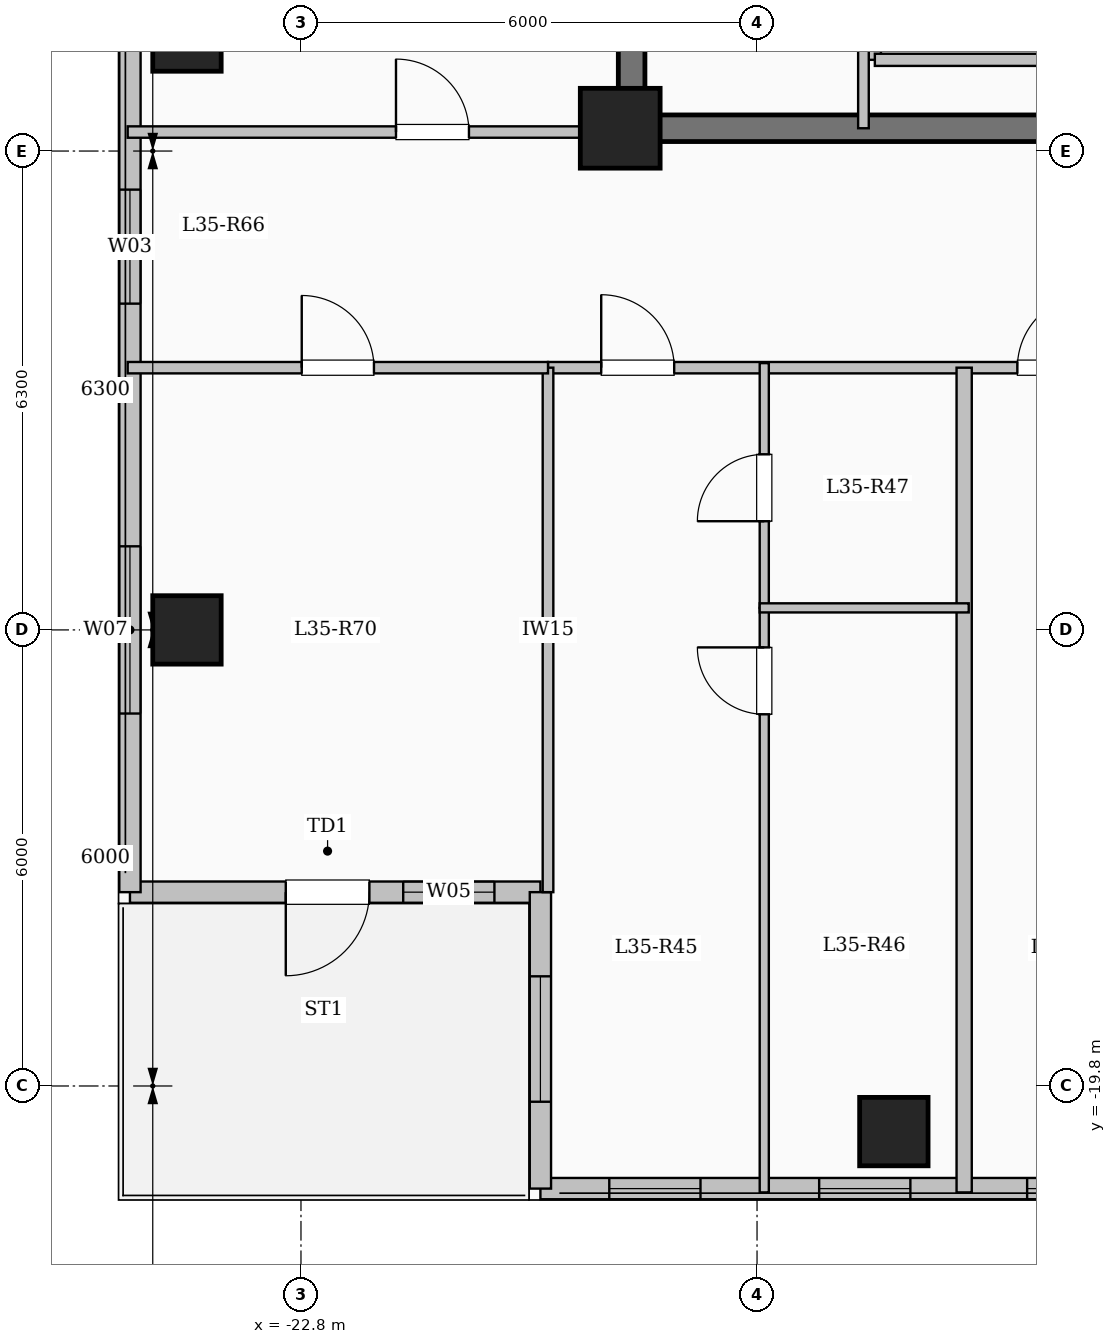
"""IFC4 building model, lengths in metres.
Left out: names, types, materials, properties, quantities, classifications, styles, units other than length and angle.
Written with IfcOpenShell. Run it as: python <this file> out.ifc"""

import sys

from ifc_helpers import new_model, si_unit, direction, frame, frame_2d, origin, origin_2d, place, context, subcontext, project, spatial, rectangle, extrude, element, fill, save


model = new_model("IFC4")
c1 = context("Model", 3, precision=1e-05, world=origin(), true_north=direction((0.0, 1.0)))
c2 = subcontext(c1, "Body", "Model", "MODEL_VIEW")
j1 = project(units=[si_unit("LENGTHUNIT", "METRE"), si_unit("PLANEANGLEUNIT", "RADIAN")], contexts=[c1])
p1 = place(None, origin())
s1 = spatial("IfcSite", under=j1, at=p1, CompositionType="ELEMENT")
p2 = place(p1, origin())
s2 = spatial("IfcBuilding", under=s1, at=p2, CompositionType="ELEMENT")
p3 = place(p2, frame((0.0, 0.0, 132.6)))
s3 = spatial("IfcBuildingStorey", under=s2, at=p3, CompositionType="ELEMENT", Elevation=132.6)
p4 = place(p3, frame((-18.6, -7.2, 0.0), z_axis=(0.0, 0.0, 1.0), x_axis=(1.0, 0.0, 0.0)))
e1 = element("IfcColumn", 1, at=p4, inside=s3, PredefinedType="COLUMN", context=c2, shape_type="SweptSolid", body=[
    extrude(rectangle(XDim=1.05, YDim=1.05, at=origin_2d()), origin(), (0.0, 0.0, 1.0), 3.35),
])
for number, where, z_axis, x_axis in (
    (2, (-15.0, -20.4, 0.0), (0.0, 0.0, 1.0), (1.0, 0.0, 0.0)),
    (3, (-24.3, -13.8, 0.0), (0.0, 0.0, 1.0), (1.0, 0.0, 0.0)),
    (4, (-24.3, -6.0, 0.0), (0.0, 0.0, 1.0), (1.0, 0.0, 0.0)),
):
    element("IfcColumn", number, at=place(p3, frame(where, z_axis=z_axis, x_axis=x_axis)), inside=s3, PredefinedType="COLUMN", context=c2, shape_type="SweptSolid", body=[
        extrude(rectangle(XDim=0.9, YDim=0.9, at=origin_2d()), origin(), (0.0, 0.0, 1.0), 3.35),
    ])
p5 = place(p3, frame((-19.65, -17.25, 0.0), z_axis=(0.0, 0.0, 1.0), x_axis=(-1.0, 0.0, 0.0)))
e5 = element("IfcWall", 5, at=p5, inside=s3, PredefinedType="SOLIDWALL", context=c2, shape_type="SweptSolid", body=[
    extrude(rectangle(XDim=5.4, YDim=0.28, at=frame_2d((2.7, 0.0))), origin(), (0.0, 0.0, 1.0), 3.1),
])
p6 = place(p5, frame((2.25, 0.0, 0.0)))
e6 = element("IfcOpeningElement", 6, at=p6, cuts=e5, PredefinedType="OPENING", context=c2, shape_type="SweptSolid", body=[
    extrude(rectangle(XDim=1.1, YDim=2.2, at=frame_2d((0.55, 1.1))), frame((0.0, 0.15, 0.0), z_axis=(0.0, -1.0, 0.0), x_axis=(1.0, 0.0, 0.0)), (0.0, 0.0, 1.0), 0.3),
])
p7 = place(p5, frame((0.605, 0.0, 0.95)))
e7 = element("IfcOpeningElement", 7, at=p7, cuts=e5, PredefinedType="OPENING", context=c2, shape_type="SweptSolid", body=[
    extrude(rectangle(XDim=1.2, YDim=1.5, at=frame_2d((0.6, 0.75))), frame((0.0, 0.15, 0.0), z_axis=(0.0, -1.0, 0.0), x_axis=(1.0, 0.0, 0.0)), (0.0, 0.0, 1.0), 0.3),
])
p8 = place(p3, frame((-25.05, -17.25, 0.0), z_axis=(0.0, 0.0, 1.0), x_axis=(0.0, 1.0, 0.0)))
e8 = element("IfcWall", 8, at=p8, inside=s3, PredefinedType="SOLIDWALL", context=c2, shape_type="SweptSolid", body=[
    extrude(rectangle(XDim=34.5, YDim=0.28, at=frame_2d((17.25, 0.0))), origin(), (0.0, 0.0, 1.0), 3.1),
])
p9 = place(p8, frame((2.35, 0.0, 0.9)))
e9 = element("IfcOpeningElement", 9, at=p9, cuts=e8, PredefinedType="OPENING", context=c2, shape_type="SweptSolid", body=[
    extrude(rectangle(XDim=2.2, YDim=1.75, at=frame_2d((1.1, 0.875))), frame((0.0, 0.15, 0.0), z_axis=(0.0, -1.0, 0.0), x_axis=(1.0, 0.0, 0.0)), (0.0, 0.0, 1.0), 0.3),
])
p10 = place(p8, frame((7.742, 0.0, 0.9)))
e10 = element("IfcOpeningElement", 10, at=p10, cuts=e8, PredefinedType="OPENING", context=c2, shape_type="SweptSolid", body=[
    extrude(rectangle(XDim=1.5, YDim=1.65, at=frame_2d((0.75, 0.825))), frame((0.0, 0.15, 0.0), z_axis=(0.0, -1.0, 0.0), x_axis=(1.0, 0.0, 0.0)), (0.0, 0.0, 1.0), 0.3),
])
p11 = place(p8, frame((13.25, 0.0, 0.9)))
e11 = element("IfcOpeningElement", 11, at=p11, cuts=e8, PredefinedType="OPENING", context=c2, shape_type="SweptSolid", body=[
    extrude(rectangle(XDim=2.2, YDim=1.75, at=frame_2d((1.1, 0.875))), frame((0.0, 0.15, 0.0), z_axis=(0.0, -1.0, 0.0), x_axis=(1.0, 0.0, 0.0)), (0.0, 0.0, 1.0), 0.3),
])
p12 = place(p8, frame((19.65, 0.0, 0.9)))
e12 = element("IfcOpeningElement", 12, at=p12, cuts=e8, PredefinedType="OPENING", context=c2, shape_type="SweptSolid", body=[
    extrude(rectangle(XDim=1.65, YDim=1.6, at=frame_2d((0.825, 0.8))), frame((0.0, 0.15, 0.0), z_axis=(0.0, -1.0, 0.0), x_axis=(1.0, 0.0, 0.0)), (0.0, 0.0, 1.0), 0.3),
])
p13 = place(p8, frame((24.125, 0.0, 0.9)))
e13 = element("IfcOpeningElement", 13, at=p13, cuts=e8, PredefinedType="OPENING", context=c2, shape_type="SweptSolid", body=[
    extrude(rectangle(XDim=2.0, YDim=1.7, at=frame_2d((1.0, 0.85))), frame((0.0, 0.15, 0.0), z_axis=(0.0, -1.0, 0.0), x_axis=(1.0, 0.0, 0.0)), (0.0, 0.0, 1.0), 0.3),
])
p14 = place(p8, frame((28.375, 0.0, 0.95)))
e14 = element("IfcOpeningElement", 14, at=p14, cuts=e8, PredefinedType="OPENING", context=c2, shape_type="SweptSolid", body=[
    extrude(rectangle(XDim=1.0, YDim=1.5, at=frame_2d((0.5, 0.75))), frame((0.0, 0.15, 0.0), z_axis=(0.0, -1.0, 0.0), x_axis=(1.0, 0.0, 0.0)), (0.0, 0.0, 1.0), 0.3),
])
p15 = place(p8, frame((31.125, 0.0, 0.9)))
e15 = element("IfcOpeningElement", 15, at=p15, cuts=e8, PredefinedType="OPENING", context=c2, shape_type="SweptSolid", body=[
    extrude(rectangle(XDim=2.0, YDim=1.7, at=frame_2d((1.0, 0.85))), frame((0.0, 0.15, 0.0), z_axis=(0.0, -1.0, 0.0), x_axis=(1.0, 0.0, 0.0)), (0.0, 0.0, 1.0), 0.3),
])
p16 = place(p3, frame((-7.35, -21.15, 0.0), z_axis=(0.0, 0.0, 1.0), x_axis=(-1.0, 0.0, 0.0)))
e16 = element("IfcWall", 16, at=p16, inside=s3, PredefinedType="SOLIDWALL", context=c2, shape_type="SweptSolid", body=[
    extrude(rectangle(XDim=12.3, YDim=0.28, at=frame_2d((6.15, 0.0))), origin(), (0.0, 0.0, 1.0), 3.1),
])
p17 = place(p16, frame((0.147, 0.0, 0.95)))
e17 = element("IfcOpeningElement", 17, at=p17, cuts=e16, PredefinedType="OPENING", context=c2, shape_type="SweptSolid", body=[
    extrude(rectangle(XDim=0.85, YDim=1.5, at=frame_2d((0.425, 0.75))), frame((0.0, 0.15, 0.0), z_axis=(0.0, -1.0, 0.0), x_axis=(1.0, 0.0, 0.0)), (0.0, 0.0, 1.0), 0.3),
])
p18 = place(p16, frame((1.96, 0.0, 0.95)))
e18 = element("IfcOpeningElement", 18, at=p18, cuts=e16, PredefinedType="OPENING", context=c2, shape_type="SweptSolid", body=[
    extrude(rectangle(XDim=1.2, YDim=1.5, at=frame_2d((0.6, 0.75))), frame((0.0, 0.15, 0.0), z_axis=(0.0, -1.0, 0.0), x_axis=(1.0, 0.0, 0.0)), (0.0, 0.0, 1.0), 0.3),
])
p19 = place(p16, frame((4.697, 0.0, 0.95)))
e19 = element("IfcOpeningElement", 19, at=p19, cuts=e16, PredefinedType="OPENING", context=c2, shape_type="SweptSolid", body=[
    extrude(rectangle(XDim=1.2, YDim=1.5, at=frame_2d((0.6, 0.75))), frame((0.0, 0.15, 0.0), z_axis=(0.0, -1.0, 0.0), x_axis=(1.0, 0.0, 0.0)), (0.0, 0.0, 1.0), 0.3),
])
p20 = place(p16, frame((7.433, 0.0, 0.95)))
e20 = element("IfcOpeningElement", 20, at=p20, cuts=e16, PredefinedType="OPENING", context=c2, shape_type="SweptSolid", body=[
    extrude(rectangle(XDim=1.2, YDim=1.5, at=frame_2d((0.6, 0.75))), frame((0.0, 0.15, 0.0), z_axis=(0.0, -1.0, 0.0), x_axis=(1.0, 0.0, 0.0)), (0.0, 0.0, 1.0), 0.3),
])
p21 = place(p16, frame((10.194, 0.0, 0.95)))
e21 = element("IfcOpeningElement", 21, at=p21, cuts=e16, PredefinedType="OPENING", context=c2, shape_type="SweptSolid", body=[
    extrude(rectangle(XDim=1.2, YDim=1.5, at=frame_2d((0.6, 0.75))), frame((0.0, 0.15, 0.0), z_axis=(0.0, -1.0, 0.0), x_axis=(1.0, 0.0, 0.0)), (0.0, 0.0, 1.0), 0.3),
])
p22 = place(p3, frame((-19.65, -21.15, 0.0), z_axis=(0.0, 0.0, 1.0), x_axis=(0.0, 1.0, 0.0)))
e22 = element("IfcWall", 22, at=p22, inside=s3, PredefinedType="SOLIDWALL", context=c2, shape_type="SweptSolid", body=[
    extrude(rectangle(XDim=3.9, YDim=0.28, at=frame_2d((1.95, 0.0))), origin(), (0.0, 0.0, 1.0), 3.1),
])
p23 = place(p22, frame((1.143, 0.0, 0.9)))
e23 = element("IfcOpeningElement", 23, at=p23, cuts=e22, PredefinedType="OPENING", context=c2, shape_type="SweptSolid", body=[
    extrude(rectangle(XDim=1.65, YDim=1.6, at=frame_2d((0.825, 0.8))), frame((0.0, 0.15, 0.0), z_axis=(0.0, -1.0, 0.0), x_axis=(1.0, 0.0, 0.0)), (0.0, 0.0, 1.0), 0.3),
])
p24 = place(p3, frame((-15.25, -6.3, 0.0), z_axis=(0.0, 0.0, 1.0), x_axis=(0.0, 1.0, 0.0)))
e24 = element("IfcWall", 24, at=p24, inside=s3, PredefinedType="SOLIDWALL", context=c2, shape_type="SweptSolid", body=[
    extrude(rectangle(XDim=2.6, YDim=0.16, at=frame_2d((1.3, 0.0))), origin(), (0.0, 0.0, 1.0), 3.1),
])
p25 = place(p3, frame((-15.25, -6.3, 0.0), z_axis=(0.0, 0.0, 1.0), x_axis=(1.0, 0.0, 0.0)))
e25 = element("IfcWall", 25, at=p25, inside=s3, PredefinedType="SOLIDWALL", context=c2, shape_type="SweptSolid", body=[
    extrude(rectangle(XDim=2.3, YDim=0.16, at=frame_2d((1.15, 0.0))), origin(), (0.0, 0.0, 1.0), 3.1),
])
p26 = place(p3, frame((-18.45, -7.375, 0.0), z_axis=(0.0, 0.0, 1.0), x_axis=(0.0, 1.0, 0.0)))
e26 = element("IfcWall", 26, at=p26, inside=s3, PredefinedType="SHEAR", context=c2, shape_type="SweptSolid", body=[
    extrude(rectangle(XDim=14.05, YDim=0.35, at=frame_2d((7.025, 0.0))), origin(), (0.0, 0.0, 1.0), 3.35),
])
p27 = place(p3, frame((-18.625, -7.2, 0.0), z_axis=(0.0, 0.0, 1.0), x_axis=(1.0, 0.0, 0.0)))
e27 = element("IfcWall", 27, at=p27, inside=s3, PredefinedType="SHEAR", context=c2, shape_type="SweptSolid", body=[
    extrude(rectangle(XDim=8.55, YDim=0.35, at=frame_2d((4.275, 0.0))), origin(), (0.0, 0.0, 1.0), 3.35),
])
p28 = place(p3, frame((-15.4, -7.2, 0.0), z_axis=(0.0, 0.0, 1.0), x_axis=(0.0, 1.0, 0.0)))
e28 = element("IfcWall", 28, at=p28, inside=s3, PredefinedType="PARTITIONING", context=c2, shape_type="SweptSolid", body=[
    extrude(rectangle(XDim=10.45, YDim=0.14, at=frame_2d((5.225, 0.0))), origin(), (0.0, 0.0, 1.0), 3.1),
])
p29 = place(p28, frame((9.25, 0.0, 0.0)))
e29 = element("IfcOpeningElement", 29, at=p29, cuts=e28, PredefinedType="OPENING", context=c2, shape_type="SweptSolid", body=[
    extrude(rectangle(XDim=0.9, YDim=2.08, at=frame_2d((0.45, 1.04))), frame((0.0, 0.08, 0.0), z_axis=(0.0, -1.0, 0.0), x_axis=(1.0, 0.0, 0.0)), (0.0, 0.0, 1.0), 0.16),
])
p30 = place(p3, frame((-19.55, -10.35, 0.0), z_axis=(0.0, 0.0, 1.0), x_axis=(1.0, 0.0, 0.0)))
e30 = element("IfcWall", 30, at=p30, inside=s3, PredefinedType="PARTITIONING", context=c2, shape_type="SweptSolid", body=[
    extrude(rectangle(XDim=11.0, YDim=0.15, at=frame_2d((5.5, 0.0))), origin(), (0.0, 0.0, 1.0), 3.1),
])
p31 = place(p30, frame((0.7, 0.0, 0.0)))
e31 = element("IfcOpeningElement", 31, at=p31, cuts=e30, PredefinedType="OPENING", context=c2, shape_type="SweptSolid", body=[
    extrude(rectangle(XDim=0.96, YDim=2.15, at=frame_2d((0.48, 1.075))), frame((0.0, 0.085, 0.0), z_axis=(0.0, -1.0, 0.0), x_axis=(1.0, 0.0, 0.0)), (0.0, 0.0, 1.0), 0.17),
])
p32 = place(p30, frame((6.175, 0.0, 0.0)))
e32 = element("IfcOpeningElement", 32, at=p32, cuts=e30, PredefinedType="OPENING", context=c2, shape_type="SweptSolid", body=[
    extrude(rectangle(XDim=0.96, YDim=2.15, at=frame_2d((0.48, 1.075))), frame((0.0, 0.085, 0.0), z_axis=(0.0, -1.0, 0.0), x_axis=(1.0, 0.0, 0.0)), (0.0, 0.0, 1.0), 0.17),
])
p33 = place(p3, frame((-14.075, -21.2, 0.0), z_axis=(0.0, 0.0, 1.0), x_axis=(0.0, 1.0, 0.0)))
e33 = element("IfcWall", 33, at=p33, inside=s3, PredefinedType="SOLIDWALL", context=c2, shape_type="SweptSolid", body=[
    extrude(rectangle(XDim=10.85, YDim=0.2, at=frame_2d((5.425, 0.0))), origin(), (0.0, 0.0, 1.0), 3.1),
])
p34 = place(p3, frame((-16.705, -21.2, 0.0), z_axis=(0.0, 0.0, 1.0), x_axis=(0.0, 1.0, 0.0)))
e34 = element("IfcWall", 34, at=p34, inside=s3, PredefinedType="PARTITIONING", context=c2, shape_type="SweptSolid", body=[
    extrude(rectangle(XDim=7.69, YDim=0.12, at=frame_2d((3.845, 0.0))), origin(), (0.0, 0.0, 1.0), 3.1),
])
p35 = place(p34, frame((6.29, 0.0, 0.0)))
e35 = element("IfcOpeningElement", 35, at=p35, cuts=e34, PredefinedType="OPENING", context=c2, shape_type="SweptSolid", body=[
    extrude(rectangle(XDim=0.88, YDim=2.1, at=frame_2d((0.44, 1.05))), frame((0.0, 0.07, 0.0), z_axis=(0.0, -1.0, 0.0), x_axis=(1.0, 0.0, 0.0)), (0.0, 0.0, 1.0), 0.14),
])
p36 = place(p3, frame((-16.705, -13.51, 0.0), z_axis=(0.0, 0.0, 1.0), x_axis=(0.0, 1.0, 0.0)))
e36 = element("IfcWall", 36, at=p36, inside=s3, PredefinedType="PARTITIONING", context=c2, shape_type="SweptSolid", body=[
    extrude(rectangle(XDim=3.22, YDim=0.12, at=frame_2d((1.61, 0.0))), origin(), (0.0, 0.0, 1.0), 3.1),
])
p37 = place(p36, frame((1.14, 0.0, 0.0)))
e37 = element("IfcOpeningElement", 37, at=p37, cuts=e36, PredefinedType="OPENING", context=c2, shape_type="SweptSolid", body=[
    extrude(rectangle(XDim=0.88, YDim=2.1, at=frame_2d((0.44, 1.05))), frame((0.0, 0.07, 0.0), z_axis=(0.0, -1.0, 0.0), x_axis=(1.0, 0.0, 0.0)), (0.0, 0.0, 1.0), 0.14),
])
p38 = place(p3, frame((-16.765, -13.51, 0.0), z_axis=(0.0, 0.0, 1.0), x_axis=(1.0, 0.0, 0.0)))
e38 = element("IfcWall", 38, at=p38, inside=s3, PredefinedType="PARTITIONING", context=c2, shape_type="SweptSolid", body=[
    extrude(rectangle(XDim=2.75, YDim=0.12, at=frame_2d((1.375, 0.0))), origin(), (0.0, 0.0, 1.0), 3.1),
])
p39 = place(p3, frame((-25.08, -7.25, 0.0), z_axis=(0.0, 0.0, 1.0), x_axis=(1.0, 0.0, 0.0)))
e39 = element("IfcWall", 39, at=p39, inside=s3, PredefinedType="PARTITIONING", context=c2, shape_type="SweptSolid", body=[
    extrude(rectangle(XDim=6.63, YDim=0.15, at=frame_2d((3.315, 0.0))), origin(), (0.0, 0.0, 1.0), 3.1),
])
p40 = place(p39, frame((3.53, 0.0, 0.0)))
e40 = element("IfcOpeningElement", 40, at=p40, cuts=e39, PredefinedType="OPENING", context=c2, shape_type="SweptSolid", body=[
    extrude(rectangle(XDim=0.96, YDim=2.15, at=frame_2d((0.48, 1.075))), frame((0.0, 0.085, 0.0), z_axis=(0.0, -1.0, 0.0), x_axis=(1.0, 0.0, 0.0)), (0.0, 0.0, 1.0), 0.17),
])
p41 = place(p3, frame((-19.55, -17.25, 0.0), z_axis=(0.0, 0.0, 1.0), x_axis=(0.0, 1.0, 0.0)))
e41 = element("IfcWall", 41, at=p41, inside=s3, PredefinedType="PARTITIONING", context=c2, shape_type="SweptSolid", body=[
    extrude(rectangle(XDim=6.9, YDim=0.14, at=frame_2d((3.45, 0.0))), origin(), (0.0, 0.0, 1.0), 3.1),
])
p42 = place(p3, frame((-25.08, -10.35, 0.0), z_axis=(0.0, 0.0, 1.0), x_axis=(1.0, 0.0, 0.0)))
e42 = element("IfcWall", 42, at=p42, inside=s3, PredefinedType="PARTITIONING", context=c2, shape_type="SweptSolid", body=[
    extrude(rectangle(XDim=5.53, YDim=0.15, at=frame_2d((2.765, 0.0))), origin(), (0.0, 0.0, 1.0), 3.1),
])
p43 = place(p42, frame((2.29, 0.0, 0.0)))
e43 = element("IfcOpeningElement", 43, at=p43, cuts=e42, PredefinedType="OPENING", context=c2, shape_type="SweptSolid", body=[
    extrude(rectangle(XDim=0.95, YDim=2.15, at=frame_2d((0.475, 1.075))), frame((0.0, 0.085, 0.0), z_axis=(0.0, -1.0, 0.0), x_axis=(1.0, 0.0, 0.0)), (0.0, 0.0, 1.0), 0.17),
])
p44 = place(p6, origin())
e44 = element("IfcDoor", 44, at=p44, inside=s3, OperationType="SINGLE_SWING_RIGHT", PredefinedType="DOOR", context=c2, shape_type="SweptSolid", body=[
    extrude(rectangle(XDim=1.1, YDim=2.2, at=frame_2d((0.55, 1.1))), frame((0.0, 0.025, 0.0), z_axis=(0.0, -1.0, 0.0), x_axis=(1.0, 0.0, 0.0)), (0.0, 0.0, 1.0), 0.05),
])
fill(e6, e44)
p45 = place(p7, origin())
e45 = element("IfcWindow", 45, at=p45, inside=s3, PartitioningType="SINGLE_PANEL", PredefinedType="WINDOW", context=c2, shape_type="SweptSolid", body=[
    extrude(rectangle(XDim=1.2, YDim=1.5, at=frame_2d((0.6, 0.75))), frame((0.0, 0.03, 0.0), z_axis=(0.0, -1.0, 0.0), x_axis=(1.0, 0.0, 0.0)), (0.0, 0.0, 1.0), 0.06),
])
fill(e7, e45)
p46 = place(p9, origin())
e46 = element("IfcWindow", 46, at=p46, inside=s3, PartitioningType="SINGLE_PANEL", PredefinedType="WINDOW", context=c2, shape_type="SweptSolid", body=[
    extrude(rectangle(XDim=2.2, YDim=1.75, at=frame_2d((1.1, 0.875))), frame((0.0, 0.03, 0.0), z_axis=(0.0, -1.0, 0.0), x_axis=(1.0, 0.0, 0.0)), (0.0, 0.0, 1.0), 0.06),
])
fill(e9, e46)
p47 = place(p10, origin())
e47 = element("IfcWindow", 47, at=p47, inside=s3, PartitioningType="SINGLE_PANEL", PredefinedType="WINDOW", context=c2, shape_type="SweptSolid", body=[
    extrude(rectangle(XDim=1.5, YDim=1.65, at=frame_2d((0.75, 0.825))), frame((0.0, 0.03, 0.0), z_axis=(0.0, -1.0, 0.0), x_axis=(1.0, 0.0, 0.0)), (0.0, 0.0, 1.0), 0.06),
])
fill(e10, e47)
p48 = place(p19, origin())
e48 = element("IfcWindow", 48, at=p48, inside=s3, PartitioningType="SINGLE_PANEL", PredefinedType="WINDOW", context=c2, shape_type="SweptSolid", body=[
    extrude(rectangle(XDim=1.2, YDim=1.5, at=frame_2d((0.6, 0.75))), frame((0.0, 0.03, 0.0), z_axis=(0.0, -1.0, 0.0), x_axis=(1.0, 0.0, 0.0)), (0.0, 0.0, 1.0), 0.06),
])
fill(e19, e48)
p49 = place(p20, origin())
e49 = element("IfcWindow", 49, at=p49, inside=s3, PartitioningType="SINGLE_PANEL", PredefinedType="WINDOW", context=c2, shape_type="SweptSolid", body=[
    extrude(rectangle(XDim=1.2, YDim=1.5, at=frame_2d((0.6, 0.75))), frame((0.0, 0.03, 0.0), z_axis=(0.0, -1.0, 0.0), x_axis=(1.0, 0.0, 0.0)), (0.0, 0.0, 1.0), 0.06),
])
fill(e20, e49)
p50 = place(p21, origin())
e50 = element("IfcWindow", 50, at=p50, inside=s3, PartitioningType="SINGLE_PANEL", PredefinedType="WINDOW", context=c2, shape_type="SweptSolid", body=[
    extrude(rectangle(XDim=1.2, YDim=1.5, at=frame_2d((0.6, 0.75))), frame((0.0, 0.03, 0.0), z_axis=(0.0, -1.0, 0.0), x_axis=(1.0, 0.0, 0.0)), (0.0, 0.0, 1.0), 0.06),
])
fill(e21, e50)
p51 = place(p23, origin())
e51 = element("IfcWindow", 51, at=p51, inside=s3, PartitioningType="SINGLE_PANEL", PredefinedType="WINDOW", context=c2, shape_type="SweptSolid", body=[
    extrude(rectangle(XDim=1.65, YDim=1.6, at=frame_2d((0.825, 0.8))), frame((0.0, 0.03, 0.0), z_axis=(0.0, -1.0, 0.0), x_axis=(1.0, 0.0, 0.0)), (0.0, 0.0, 1.0), 0.06),
])
fill(e23, e51)
p52 = place(p31, origin())
e52 = element("IfcDoor", 52, at=p52, inside=s3, OperationType="SINGLE_SWING_LEFT", PredefinedType="DOOR", context=c2, shape_type="SweptSolid", body=[
    extrude(rectangle(XDim=0.96, YDim=2.15, at=frame_2d((0.48, 1.075))), frame((0.0, 0.025, 0.0), z_axis=(0.0, -1.0, 0.0), x_axis=(1.0, 0.0, 0.0)), (0.0, 0.0, 1.0), 0.05),
])
fill(e31, e52)
p53 = place(p35, origin())
e53 = element("IfcDoor", 53, at=p53, inside=s3, OperationType="SINGLE_SWING_RIGHT", PredefinedType="DOOR", context=c2, shape_type="SweptSolid", body=[
    extrude(rectangle(XDim=0.88, YDim=2.1, at=frame_2d((0.44, 1.05))), frame((0.0, 0.025, 0.0), z_axis=(0.0, -1.0, 0.0), x_axis=(1.0, 0.0, 0.0)), (0.0, 0.0, 1.0), 0.05),
])
fill(e35, e53)
p54 = place(p37, origin())
e54 = element("IfcDoor", 54, at=p54, inside=s3, OperationType="SINGLE_SWING_LEFT", PredefinedType="DOOR", context=c2, shape_type="SweptSolid", body=[
    extrude(rectangle(XDim=0.88, YDim=2.1, at=frame_2d((0.44, 1.05))), frame((0.0, 0.025, 0.0), z_axis=(0.0, -1.0, 0.0), x_axis=(1.0, 0.0, 0.0)), (0.0, 0.0, 1.0), 0.05),
])
fill(e37, e54)
p55 = place(p32, origin())
e55 = element("IfcDoor", 55, at=p55, inside=s3, OperationType="SINGLE_SWING_RIGHT", PredefinedType="DOOR", context=c2, shape_type="SweptSolid", body=[
    extrude(rectangle(XDim=0.96, YDim=2.15, at=frame_2d((0.48, 1.075))), frame((0.0, 0.025, 0.0), z_axis=(0.0, -1.0, 0.0), x_axis=(1.0, 0.0, 0.0)), (0.0, 0.0, 1.0), 0.05),
])
fill(e32, e55)
p56 = place(p43, origin())
e56 = element("IfcDoor", 56, at=p56, inside=s3, OperationType="SINGLE_SWING_LEFT", PredefinedType="DOOR", context=c2, shape_type="SweptSolid", body=[
    extrude(rectangle(XDim=0.95, YDim=2.15, at=frame_2d((0.475, 1.075))), frame((0.0, 0.025, 0.0), z_axis=(0.0, -1.0, 0.0), x_axis=(1.0, 0.0, 0.0)), (0.0, 0.0, 1.0), 0.05),
])
fill(e43, e56)
p57 = place(p40, origin())
e57 = element("IfcDoor", 57, at=p57, inside=s3, OperationType="SINGLE_SWING_LEFT", PredefinedType="DOOR", context=c2, shape_type="SweptSolid", body=[
    extrude(rectangle(XDim=0.96, YDim=2.15, at=frame_2d((0.48, 1.075))), frame((0.0, 0.025, 0.0), z_axis=(0.0, -1.0, 0.0), x_axis=(1.0, 0.0, 0.0)), (0.0, 0.0, 1.0), 0.05),
])
fill(e40, e57)
save(model, sys.argv[1])
